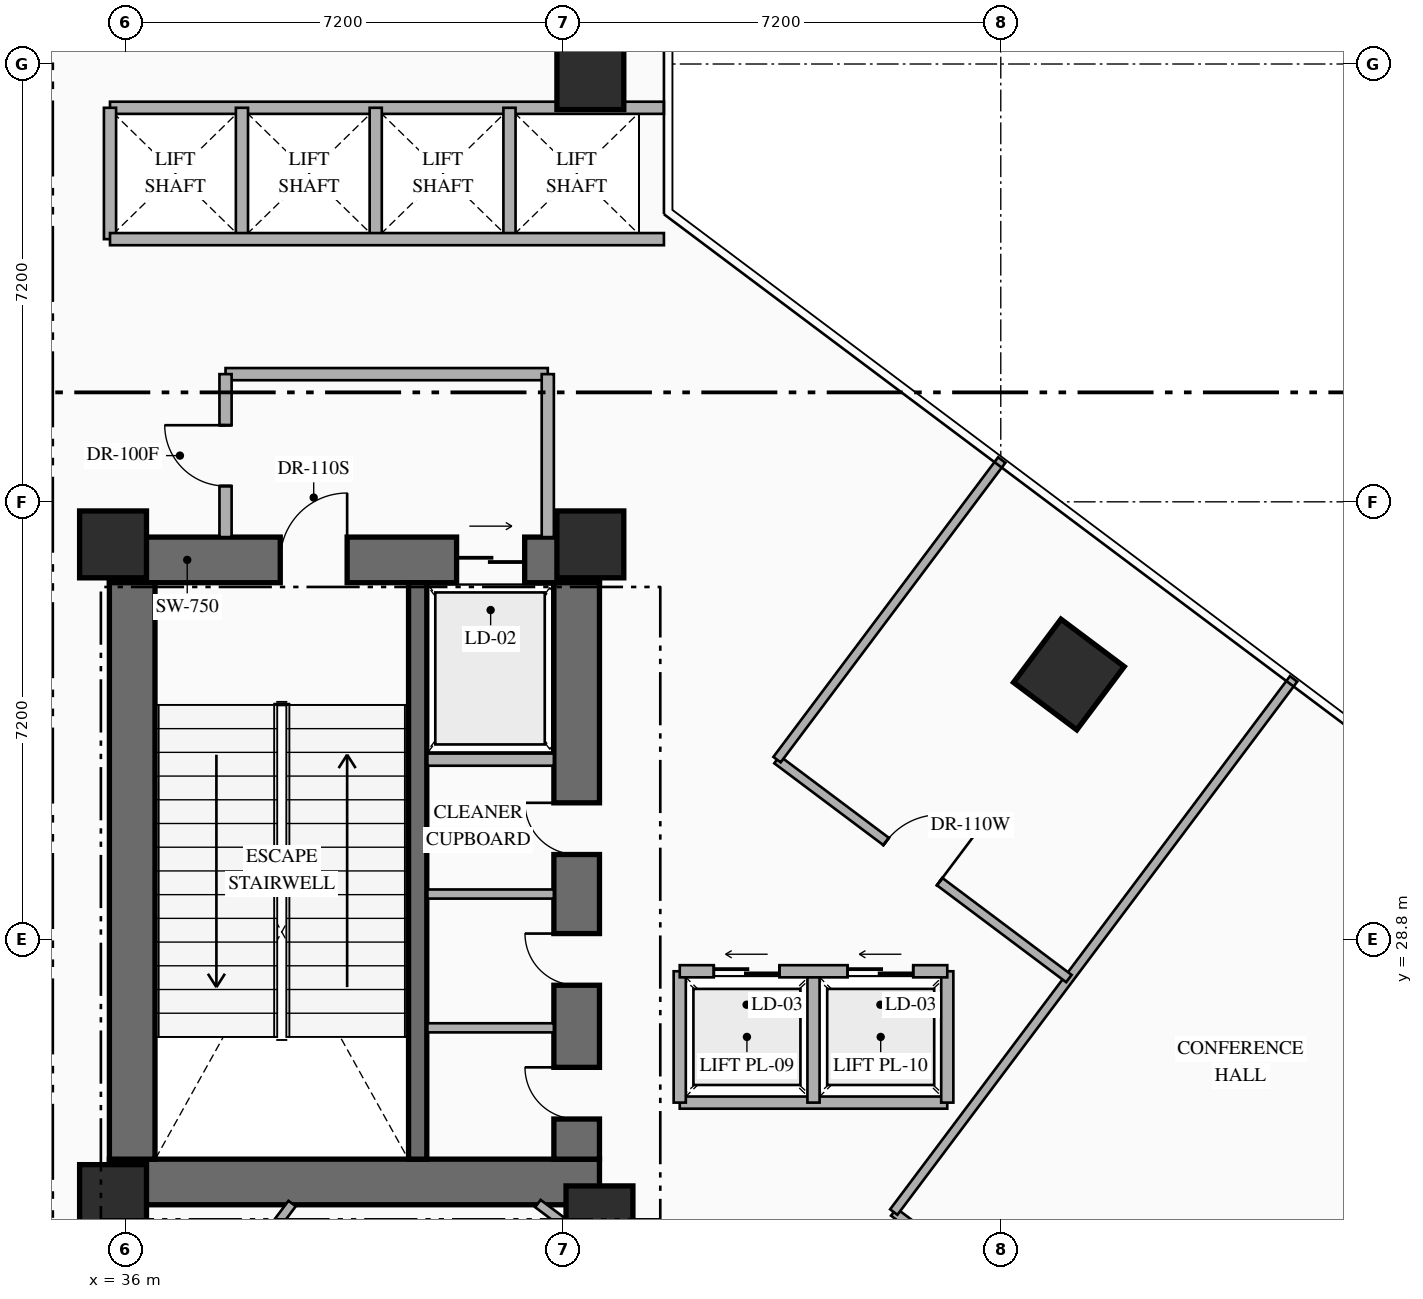
"""IFC4 building model, lengths in metres.
Left out: names, types, materials, properties, quantities, classifications, styles, units other than length and angle.
Written with IfcOpenShell. Run it as: python <this file> out.ifc"""

import sys

from ifc_helpers import new_model, si_unit, direction, frame, frame_2d, origin, origin_2d, place, context, subcontext, project, spatial, rectangle, extrude, element, fill, save


model = new_model("IFC4")
c1 = context("Model", 3, precision=1e-05, world=origin(), true_north=direction((0.0, 1.0)))
c2 = subcontext(c1, "Body", "Model", "MODEL_VIEW")
j1 = project(units=[si_unit("LENGTHUNIT", "METRE"), si_unit("PLANEANGLEUNIT", "RADIAN")], contexts=[c1])
p1 = place(None, origin())
s1 = spatial("IfcSite", under=j1, at=p1, CompositionType="ELEMENT")
p2 = place(p1, origin())
s2 = spatial("IfcBuilding", under=s1, at=p2, CompositionType="ELEMENT")
p3 = place(p2, frame((0.0, 0.0, 10.8)))
s3 = spatial("IfcBuildingStorey", under=s2, at=p3, CompositionType="ELEMENT", Elevation=10.8)
p4 = place(p3, frame((35.74, 24.815, 0.0), z_axis=(0.0, 0.0, 1.0), x_axis=(1.0, 0.0, 0.0)))
e1 = element("IfcWall", 1, at=p4, inside=s3, PredefinedType="SHEAR", context=c2, shape_type="SweptSolid", body=[
    extrude(rectangle(XDim=8.06, YDim=0.75, at=frame_2d((4.03, 0.0))), origin(), (0.0, 0.0, 1.0), 5.4),
])
p5 = place(p3, frame((35.74, 35.045, 0.0), z_axis=(0.0, 0.0, 1.0), x_axis=(1.0, 0.0, 0.0)))
e2 = element("IfcWall", 2, at=p5, inside=s3, PredefinedType="SHEAR", context=c2, shape_type="SweptSolid", body=[
    extrude(rectangle(XDim=8.06, YDim=0.75, at=frame_2d((4.03, 0.0))), origin(), (0.0, 0.0, 1.0), 5.4),
])
p6 = place(p5, frame((2.81, 0.0, 0.0)))
e3 = element("IfcOpeningElement", 3, at=p6, cuts=e2, PredefinedType="OPENING", context=c2, shape_type="SweptSolid", body=[
    extrude(rectangle(XDim=1.1, YDim=2.2, at=frame_2d((0.55, 1.1))), frame((0.0, 0.385, 0.0), z_axis=(0.0, -1.0, 0.0), x_axis=(1.0, 0.0, 0.0)), (0.0, 0.0, 1.0), 0.77),
])
p7 = place(p5, frame((5.71, 0.0, 0.0)))
e4 = element("IfcOpeningElement", 4, at=p7, cuts=e2, PredefinedType="OPENING", context=c2, shape_type="SweptSolid", body=[
    extrude(rectangle(XDim=1.12, YDim=2.15, at=frame_2d((0.56, 1.075))), frame((0.0, 0.385, 0.0), z_axis=(0.0, -1.0, 0.0), x_axis=(1.0, 0.0, 0.0)), (0.0, 0.0, 1.0), 0.77),
])
p8 = place(p3, frame((36.115, 25.19, 0.0), z_axis=(0.0, 0.0, 1.0), x_axis=(0.0, 1.0, 0.0)))
e5 = element("IfcWall", 5, at=p8, inside=s3, PredefinedType="SHEAR", context=c2, shape_type="SweptSolid", body=[
    extrude(rectangle(XDim=9.48, YDim=0.75, at=frame_2d((4.74, 0.0))), origin(), (0.0, 0.0, 1.0), 5.4),
])
p9 = place(p3, frame((43.425, 25.19, 0.0), z_axis=(0.0, 0.0, 1.0), x_axis=(0.0, 1.0, 0.0)))
e6 = element("IfcWall", 6, at=p9, inside=s3, PredefinedType="SHEAR", context=c2, shape_type="SweptSolid", body=[
    extrude(rectangle(XDim=9.48, YDim=0.75, at=frame_2d((4.74, 0.0))), origin(), (0.0, 0.0, 1.0), 5.4),
])
p10 = place(p9, frame((0.66, 0.0, 0.0)))
e7 = element("IfcOpeningElement", 7, at=p10, cuts=e6, PredefinedType="OPENING", context=c2, shape_type="SweptSolid", body=[
    extrude(rectangle(XDim=0.85, YDim=2.08, at=frame_2d((0.425, 1.04))), frame((0.0, 0.385, 0.0), z_axis=(0.0, -1.0, 0.0), x_axis=(1.0, 0.0, 0.0)), (0.0, 0.0, 1.0), 0.77),
])
p11 = place(p9, frame((2.86, 0.0, 0.0)))
e8 = element("IfcOpeningElement", 8, at=p11, cuts=e6, PredefinedType="OPENING", context=c2, shape_type="SweptSolid", body=[
    extrude(rectangle(XDim=0.85, YDim=2.08, at=frame_2d((0.425, 1.04))), frame((0.0, 0.385, 0.0), z_axis=(0.0, -1.0, 0.0), x_axis=(1.0, 0.0, 0.0)), (0.0, 0.0, 1.0), 0.77),
])
p12 = place(p9, frame((5.01, 0.0, 0.0)))
e9 = element("IfcOpeningElement", 9, at=p12, cuts=e6, PredefinedType="OPENING", context=c2, shape_type="SweptSolid", body=[
    extrude(rectangle(XDim=0.85, YDim=2.08, at=frame_2d((0.425, 1.04))), frame((0.0, 0.385, 0.0), z_axis=(0.0, -1.0, 0.0), x_axis=(1.0, 0.0, 0.0)), (0.0, 0.0, 1.0), 0.77),
])
p13 = place(p3, frame((40.81, 25.19, 0.0), z_axis=(0.0, 0.0, 1.0), x_axis=(0.0, 1.0, 0.0)))
e10 = element("IfcWall", 10, at=p13, inside=s3, PredefinedType="SHEAR", context=c2, shape_type="SweptSolid", body=[
    extrude(rectangle(XDim=9.48, YDim=0.3, at=frame_2d((4.74, 0.0))), origin(), (0.0, 0.0, 1.0), 5.4),
])
for number, where, z_axis, x_axis in (
    (11, (35.8, 24.55, 0.0), (0.0, 0.0, 1.0), (1.0, 0.0, 0.0)),
    (12, (43.8, 24.2, 0.0), (0.0, 0.0, 1.0), (1.0, 0.0, 0.0)),
    (13, (35.8, 35.3, 0.0), (0.0, 0.0, 1.0), (1.0, 0.0, 0.0)),
    (14, (43.65, 35.3, 0.0), (0.0, 0.0, 1.0), (1.0, 0.0, 0.0)),
    (15, (43.65, 43.0, 0.0), (0.0, 0.0, 1.0), (1.0, 0.0, 0.0)),
):
    element("IfcColumn", number, at=place(p3, frame(where, z_axis=z_axis, x_axis=x_axis)), inside=s3, PredefinedType="COLUMN", context=c2, shape_type="SweptSolid", body=[
        extrude(rectangle(XDim=1.1, YDim=1.1, at=origin_2d()), origin(), (0.0, 0.0, 1.0), 5.4),
    ])
p14 = place(p3, frame((51.52, 33.16, 0.0), z_axis=(0.0, 0.0, 1.0), x_axis=(0.799999996291, -0.600000004945, 0.0)))
e16 = element("IfcColumn", 16, at=p14, inside=s3, PredefinedType="COLUMN", context=c2, shape_type="SweptSolid", body=[
    extrude(rectangle(XDim=1.3, YDim=1.3, at=origin_2d()), origin(), (0.0, 0.0, 1.0), 5.4),
])
p15 = place(p3, frame((40.97, 31.76, 0.0), z_axis=(0.0, 0.0, 1.0), x_axis=(1.0, 0.0, 0.0)))
e17 = element("IfcWall", 17, at=p15, inside=s3, PredefinedType="STANDARD", context=c2, shape_type="SweptSolid", body=[
    extrude(rectangle(XDim=2.08, YDim=0.2, at=frame_2d((1.04, 0.0))), origin(), (0.0, 0.0, 1.0), 5.1),
])
for number, where, z_axis, x_axis in (
    (18, (40.97, 27.35, 0.0), (0.0, 0.0, 1.0), (1.0, 0.0, 0.0)),
    (19, (40.97, 29.55, 0.0), (0.0, 0.0, 1.0), (1.0, 0.0, 0.0)),
):
    element("IfcWall", number, at=place(p3, frame(where, z_axis=z_axis, x_axis=x_axis)), inside=s3, PredefinedType="PARTITIONING", context=c2, shape_type="SweptSolid", body=[
        extrude(rectangle(XDim=2.08, YDim=0.15, at=frame_2d((1.04, 0.0))), origin(), (0.0, 0.0, 1.0), 5.1),
    ])
p16 = place(p3, frame((37.65, 38.1, 0.0), z_axis=(0.0, 0.0, 1.0), x_axis=(1.0, 0.0, 0.0)))
e20 = element("IfcWall", 20, at=p16, inside=s3, PredefinedType="STANDARD", context=c2, shape_type="SweptSolid", body=[
    extrude(rectangle(XDim=5.3, YDim=0.2, at=frame_2d((2.65, 0.0))), origin(), (0.0, 0.0, 1.0), 5.1),
])
p17 = place(p3, frame((42.95, 35.42, 0.0), z_axis=(0.0, 0.0, 1.0), x_axis=(0.0, 1.0, 0.0)))
e21 = element("IfcWall", 21, at=p17, inside=s3, PredefinedType="STANDARD", context=c2, shape_type="SweptSolid", body=[
    extrude(rectangle(XDim=2.68, YDim=0.2, at=frame_2d((1.34, 0.0))), origin(), (0.0, 0.0, 1.0), 5.1),
])
p18 = place(p3, frame((37.65, 35.42, 0.0), z_axis=(0.0, 0.0, 1.0), x_axis=(0.0, 1.0, 0.0)))
e22 = element("IfcWall", 22, at=p18, inside=s3, PredefinedType="STANDARD", context=c2, shape_type="SweptSolid", body=[
    extrude(rectangle(XDim=2.68, YDim=0.2, at=frame_2d((1.34, 0.0))), origin(), (0.0, 0.0, 1.0), 5.1),
])
p19 = place(p18, frame((0.84, 0.0, 0.0)))
e23 = element("IfcOpeningElement", 23, at=p19, cuts=e22, PredefinedType="OPENING", context=c2, shape_type="SweptSolid", body=[
    extrude(rectangle(XDim=1.0, YDim=2.2, at=frame_2d((0.5, 1.1))), frame((0.0, 0.11, 0.0), z_axis=(0.0, -1.0, 0.0), x_axis=(1.0, 0.0, 0.0)), (0.0, 0.0, 1.0), 0.22),
])
p20 = place(p3, frame((35.75, 42.48, 0.0), z_axis=(0.0, 0.0, 1.0), x_axis=(1.0, 0.0, 0.0)))
e24 = element("IfcWall", 24, at=p20, inside=s3, PredefinedType="STANDARD", context=c2, shape_type="SweptSolid", body=[
    extrude(rectangle(XDim=9.11, YDim=0.2, at=frame_2d((4.555, 0.0))), origin(), (0.0, 0.0, 1.0), 5.1),
])
for number, where, z_axis, x_axis in (
    (25, (35.75, 40.32, 0.0), (0.0, 0.0, 1.0), (0.0, 1.0, 0.0)),
    (26, (37.92, 40.32, 0.0), (0.0, 0.0, 1.0), (0.0, 1.0, 0.0)),
    (27, (40.12, 40.32, 0.0), (0.0, 0.0, 1.0), (0.0, 1.0, 0.0)),
    (28, (42.32, 40.32, 0.0), (0.0, 0.0, 1.0), (0.0, 1.0, 0.0)),
):
    element("IfcWall", number, at=place(p3, frame(where, z_axis=z_axis, x_axis=x_axis)), inside=s3, PredefinedType="STANDARD", context=c2, shape_type="SweptSolid", body=[
        extrude(rectangle(XDim=2.16, YDim=0.2, at=frame_2d((1.08, 0.0))), origin(), (0.0, 0.0, 1.0), 5.1),
    ])
p21 = place(p3, frame((35.75, 40.32, 0.0), z_axis=(0.0, 0.0, 1.0), x_axis=(1.0, 0.0, 0.0)))
e29 = element("IfcWall", 29, at=p21, inside=s3, PredefinedType="STANDARD", context=c2, shape_type="SweptSolid", body=[
    extrude(rectangle(XDim=9.11, YDim=0.2, at=frame_2d((4.555, 0.0))), origin(), (0.0, 0.0, 1.0), 5.1),
])
p22 = place(p3, frame((45.12, 26.12, 0.0), z_axis=(0.0, 0.0, 1.0), x_axis=(1.0, 0.0, 0.0)))
e30 = element("IfcWall", 30, at=p22, inside=s3, PredefinedType="STANDARD", context=c2, shape_type="SweptSolid", body=[
    extrude(rectangle(XDim=4.4, YDim=0.2, at=frame_2d((2.2, 0.0))), origin(), (0.0, 0.0, 1.0), 5.1),
])
for number, where, z_axis, x_axis in (
    (31, (45.12, 26.12, 0.0), (0.0, 0.0, 1.0), (0.0, 1.0, 0.0)),
    (32, (49.52, 26.12, 0.0), (0.0, 0.0, 1.0), (0.0, 1.0, 0.0)),
    (33, (47.32, 26.12, 0.0), (0.0, 0.0, 1.0), (0.0, 1.0, 0.0)),
):
    element("IfcWall", number, at=place(p3, frame(where, z_axis=z_axis, x_axis=x_axis)), inside=s3, PredefinedType="STANDARD", context=c2, shape_type="SweptSolid", body=[
        extrude(rectangle(XDim=2.16, YDim=0.2, at=frame_2d((1.08, 0.0))), origin(), (0.0, 0.0, 1.0), 5.1),
    ])
p23 = place(p3, frame((45.12, 28.28, 0.0), z_axis=(0.0, 0.0, 1.0), x_axis=(1.0, 0.0, 0.0)))
e34 = element("IfcWall", 34, at=p23, inside=s3, PredefinedType="STANDARD", context=c2, shape_type="SweptSolid", body=[
    extrude(rectangle(XDim=4.4, YDim=0.2, at=frame_2d((2.2, 0.0))), origin(), (0.0, 0.0, 1.0), 5.1),
])
p24 = place(p23, frame((0.56, 0.0, 0.0)))
e35 = element("IfcOpeningElement", 35, at=p24, cuts=e34, PredefinedType="OPENING", context=c2, shape_type="SweptSolid", body=[
    extrude(rectangle(XDim=1.08, YDim=2.15, at=frame_2d((0.54, 1.075))), frame((0.0, 0.11, 0.0), z_axis=(0.0, -1.0, 0.0), x_axis=(1.0, 0.0, 0.0)), (0.0, 0.0, 1.0), 0.22),
])
p25 = place(p23, frame((2.76, 0.0, 0.0)))
e36 = element("IfcOpeningElement", 36, at=p25, cuts=e34, PredefinedType="OPENING", context=c2, shape_type="SweptSolid", body=[
    extrude(rectangle(XDim=1.08, YDim=2.15, at=frame_2d((0.54, 1.075))), frame((0.0, 0.11, 0.0), z_axis=(0.0, -1.0, 0.0), x_axis=(1.0, 0.0, 0.0)), (0.0, 0.0, 1.0), 0.22),
])
p26 = place(p3, frame((48.64, 24.32, 0.0), z_axis=(0.0, 0.0, 1.0), x_axis=(0.80000474051, -0.599993679268, 0.0)))
e37 = element("IfcWall", 37, at=p26, inside=s3, PredefinedType="PARTITIONING", context=c2, shape_type="SweptSolid", body=[
    extrude(rectangle(XDim=6.18, YDim=0.15, at=frame_2d((3.09, 0.0))), origin(), (0.0, 0.0, 1.0), 5.1),
])
p27 = place(p26, frame((2.54, 0.0, 0.0)))
e38 = element("IfcOpeningElement", 38, at=p27, cuts=e37, PredefinedType="OPENING", context=c2, shape_type="SweptSolid", body=[
    extrude(rectangle(XDim=1.1, YDim=2.16, at=frame_2d((0.55, 1.08))), frame((0.0, 0.085, 0.0), z_axis=(0.0, -1.0, 0.0), x_axis=(1.0, 0.0, 0.0)), (0.0, 0.0, 1.0), 0.17),
])
p28 = place(p3, frame((48.64, 24.32, 0.0), z_axis=(0.0, 0.0, 1.0), x_axis=(0.600017820398, 0.799986634391, 0.0)))
e39 = element("IfcWall", 39, at=p28, inside=s3, PredefinedType="PARTITIONING", context=c2, shape_type="SweptSolid", body=[
    extrude(rectangle(XDim=10.96, YDim=0.15, at=frame_2d((5.48, 0.0))), origin(), (0.0, 0.0, 1.0), 5.1),
])
p29 = place(p3, frame((53.584, 20.612, 0.0), z_axis=(0.0, 0.0, 1.0), x_axis=(0.600003564151, 0.799997326874, 0.0)))
e40 = element("IfcWall", 40, at=p29, inside=s3, PredefinedType="PARTITIONING", context=c2, shape_type="SweptSolid", body=[
    extrude(rectangle(XDim=10.96, YDim=0.15, at=frame_2d((5.48, 0.0))), origin(), (0.0, 0.0, 1.0), 5.1),
])
p30 = place(p3, frame((46.72, 31.76, 0.0), z_axis=(0.0, 0.0, 1.0), x_axis=(0.79999511724, -0.600006510291, 0.0)))
e41 = element("IfcWall", 41, at=p30, inside=s3, PredefinedType="PARTITIONING", context=c2, shape_type="SweptSolid", body=[
    extrude(rectangle(XDim=6.0, YDim=0.15, at=frame_2d((3.0, 0.0))), origin(), (0.0, 0.0, 1.0), 5.1),
])
p31 = place(p30, frame((2.243, 0.0, 0.0)))
e42 = element("IfcOpeningElement", 42, at=p31, cuts=e41, PredefinedType="OPENING", context=c2, shape_type="SweptSolid", body=[
    extrude(rectangle(XDim=1.1, YDim=2.16, at=frame_2d((0.55, 1.08))), frame((0.0, 0.085, 0.0), z_axis=(0.0, -1.0, 0.0), x_axis=(1.0, 0.0, 0.0)), (0.0, 0.0, 1.0), 0.17),
])
p32 = place(p3, frame((46.72, 31.76, 0.0), z_axis=(0.0, 0.0, 1.0), x_axis=(0.600006341286, 0.799995243996, 0.0)))
e43 = element("IfcWall", 43, at=p32, inside=s3, PredefinedType="PARTITIONING", context=c2, shape_type="SweptSolid", body=[
    extrude(rectangle(XDim=6.16, YDim=0.15, at=frame_2d((3.08, 0.0))), origin(), (0.0, 0.0, 1.0), 5.1),
])
p33 = place(p3, frame((42.787, 24.46, 0.0), z_axis=(0.0, 0.0, 1.0), x_axis=(0.799971872363, -0.600037501685, 0.0)))
e44 = element("IfcWall", 44, at=p33, inside=s3, PredefinedType="PARTITIONING", context=c2, shape_type="SweptSolid", body=[
    extrude(rectangle(XDim=4.167, YDim=0.15, at=frame_2d((2.083, 0.0))), origin(), (0.0, 0.0, 1.0), 5.1),
])
p34 = place(p33, frame((2.468, 0.0, 0.0)))
e45 = element("IfcOpeningElement", 45, at=p34, cuts=e44, PredefinedType="OPENING", context=c2, shape_type="SweptSolid", body=[
    extrude(rectangle(XDim=0.95, YDim=2.15, at=frame_2d((0.475, 1.075))), frame((0.0, 0.085, 0.0), z_axis=(0.0, -1.0, 0.0), x_axis=(1.0, 0.0, 0.0)), (0.0, 0.0, 1.0), 0.17),
])
p35 = place(p3, frame((33.384, 17.312, 0.0), z_axis=(0.0, 0.0, 1.0), x_axis=(0.600008743659, 0.799993442181, 0.0)))
e46 = element("IfcWall", 46, at=p35, inside=s3, PredefinedType="PARTITIONING", context=c2, shape_type="SweptSolid", body=[
    extrude(rectangle(XDim=8.935, YDim=0.15, at=frame_2d((4.468, 0.0))), origin(), (0.0, 0.0, 1.0), 5.1),
])
p36 = place(p6, origin())
e47 = element("IfcDoor", 47, at=p36, inside=s3, OperationType="SINGLE_SWING_RIGHT", PredefinedType="DOOR", context=c2, shape_type="SweptSolid", body=[
    extrude(rectangle(XDim=1.1, YDim=2.2, at=frame_2d((0.55, 1.1))), frame((0.0, 0.025, 0.0), z_axis=(0.0, -1.0, 0.0), x_axis=(1.0, 0.0, 0.0)), (0.0, 0.0, 1.0), 0.05),
])
fill(e3, e47)
p37 = place(p7, origin())
e48 = element("IfcDoor", 48, at=p37, inside=s3, OperationType="SLIDING_TO_RIGHT", PredefinedType="USERDEFINED", context=c2, shape_type="SweptSolid", body=[
    extrude(rectangle(XDim=1.12, YDim=2.15, at=frame_2d((0.56, 1.075))), frame((0.0, 0.025, 0.0), z_axis=(0.0, -1.0, 0.0), x_axis=(1.0, 0.0, 0.0)), (0.0, 0.0, 1.0), 0.05),
])
fill(e4, e48)
p38 = place(p10, origin())
e49 = element("IfcDoor", 49, at=p38, inside=s3, OperationType="SINGLE_SWING_RIGHT", PredefinedType="DOOR", context=c2, shape_type="SweptSolid", body=[
    extrude(rectangle(XDim=0.85, YDim=2.08, at=frame_2d((0.425, 1.04))), frame((0.0, 0.025, 0.0), z_axis=(0.0, -1.0, 0.0), x_axis=(1.0, 0.0, 0.0)), (0.0, 0.0, 1.0), 0.05),
])
fill(e7, e49)
p39 = place(p11, origin())
e50 = element("IfcDoor", 50, at=p39, inside=s3, OperationType="SINGLE_SWING_RIGHT", PredefinedType="DOOR", context=c2, shape_type="SweptSolid", body=[
    extrude(rectangle(XDim=0.85, YDim=2.08, at=frame_2d((0.425, 1.04))), frame((0.0, 0.025, 0.0), z_axis=(0.0, -1.0, 0.0), x_axis=(1.0, 0.0, 0.0)), (0.0, 0.0, 1.0), 0.05),
])
fill(e8, e50)
p40 = place(p12, origin())
e51 = element("IfcDoor", 51, at=p40, inside=s3, OperationType="SINGLE_SWING_RIGHT", PredefinedType="DOOR", context=c2, shape_type="SweptSolid", body=[
    extrude(rectangle(XDim=0.85, YDim=2.08, at=frame_2d((0.425, 1.04))), frame((0.0, 0.025, 0.0), z_axis=(0.0, -1.0, 0.0), x_axis=(1.0, 0.0, 0.0)), (0.0, 0.0, 1.0), 0.05),
])
fill(e9, e51)
p41 = place(p19, origin())
e52 = element("IfcDoor", 52, at=p41, inside=s3, OperationType="SINGLE_SWING_RIGHT", PredefinedType="DOOR", context=c2, shape_type="SweptSolid", body=[
    extrude(rectangle(XDim=1.0, YDim=2.2, at=frame_2d((0.5, 1.1))), frame((0.0, 0.025, 0.0), z_axis=(0.0, -1.0, 0.0), x_axis=(1.0, 0.0, 0.0)), (0.0, 0.0, 1.0), 0.05),
])
fill(e23, e52)
p42 = place(p24, origin())
e53 = element("IfcDoor", 53, at=p42, inside=s3, OperationType="SLIDING_TO_LEFT", PredefinedType="USERDEFINED", context=c2, shape_type="SweptSolid", body=[
    extrude(rectangle(XDim=1.08, YDim=2.15, at=frame_2d((0.54, 1.075))), frame((0.0, 0.025, 0.0), z_axis=(0.0, -1.0, 0.0), x_axis=(1.0, 0.0, 0.0)), (0.0, 0.0, 1.0), 0.05),
])
fill(e35, e53)
p43 = place(p25, origin())
e54 = element("IfcDoor", 54, at=p43, inside=s3, OperationType="SLIDING_TO_LEFT", PredefinedType="USERDEFINED", context=c2, shape_type="SweptSolid", body=[
    extrude(rectangle(XDim=1.08, YDim=2.15, at=frame_2d((0.54, 1.075))), frame((0.0, 0.025, 0.0), z_axis=(0.0, -1.0, 0.0), x_axis=(1.0, 0.0, 0.0)), (0.0, 0.0, 1.0), 0.05),
])
fill(e36, e54)
p44 = place(p31, origin())
e55 = element("IfcDoor", 55, at=p44, inside=s3, OperationType="SINGLE_SWING_RIGHT", PredefinedType="DOOR", context=c2, shape_type="SweptSolid", body=[
    extrude(rectangle(XDim=1.1, YDim=2.16, at=frame_2d((0.55, 1.08))), frame((0.0, 0.025, 0.0), z_axis=(0.0, -1.0, 0.0), x_axis=(1.0, 0.0, 0.0)), (0.0, 0.0, 1.0), 0.05),
])
fill(e42, e55)
save(model, sys.argv[1])
